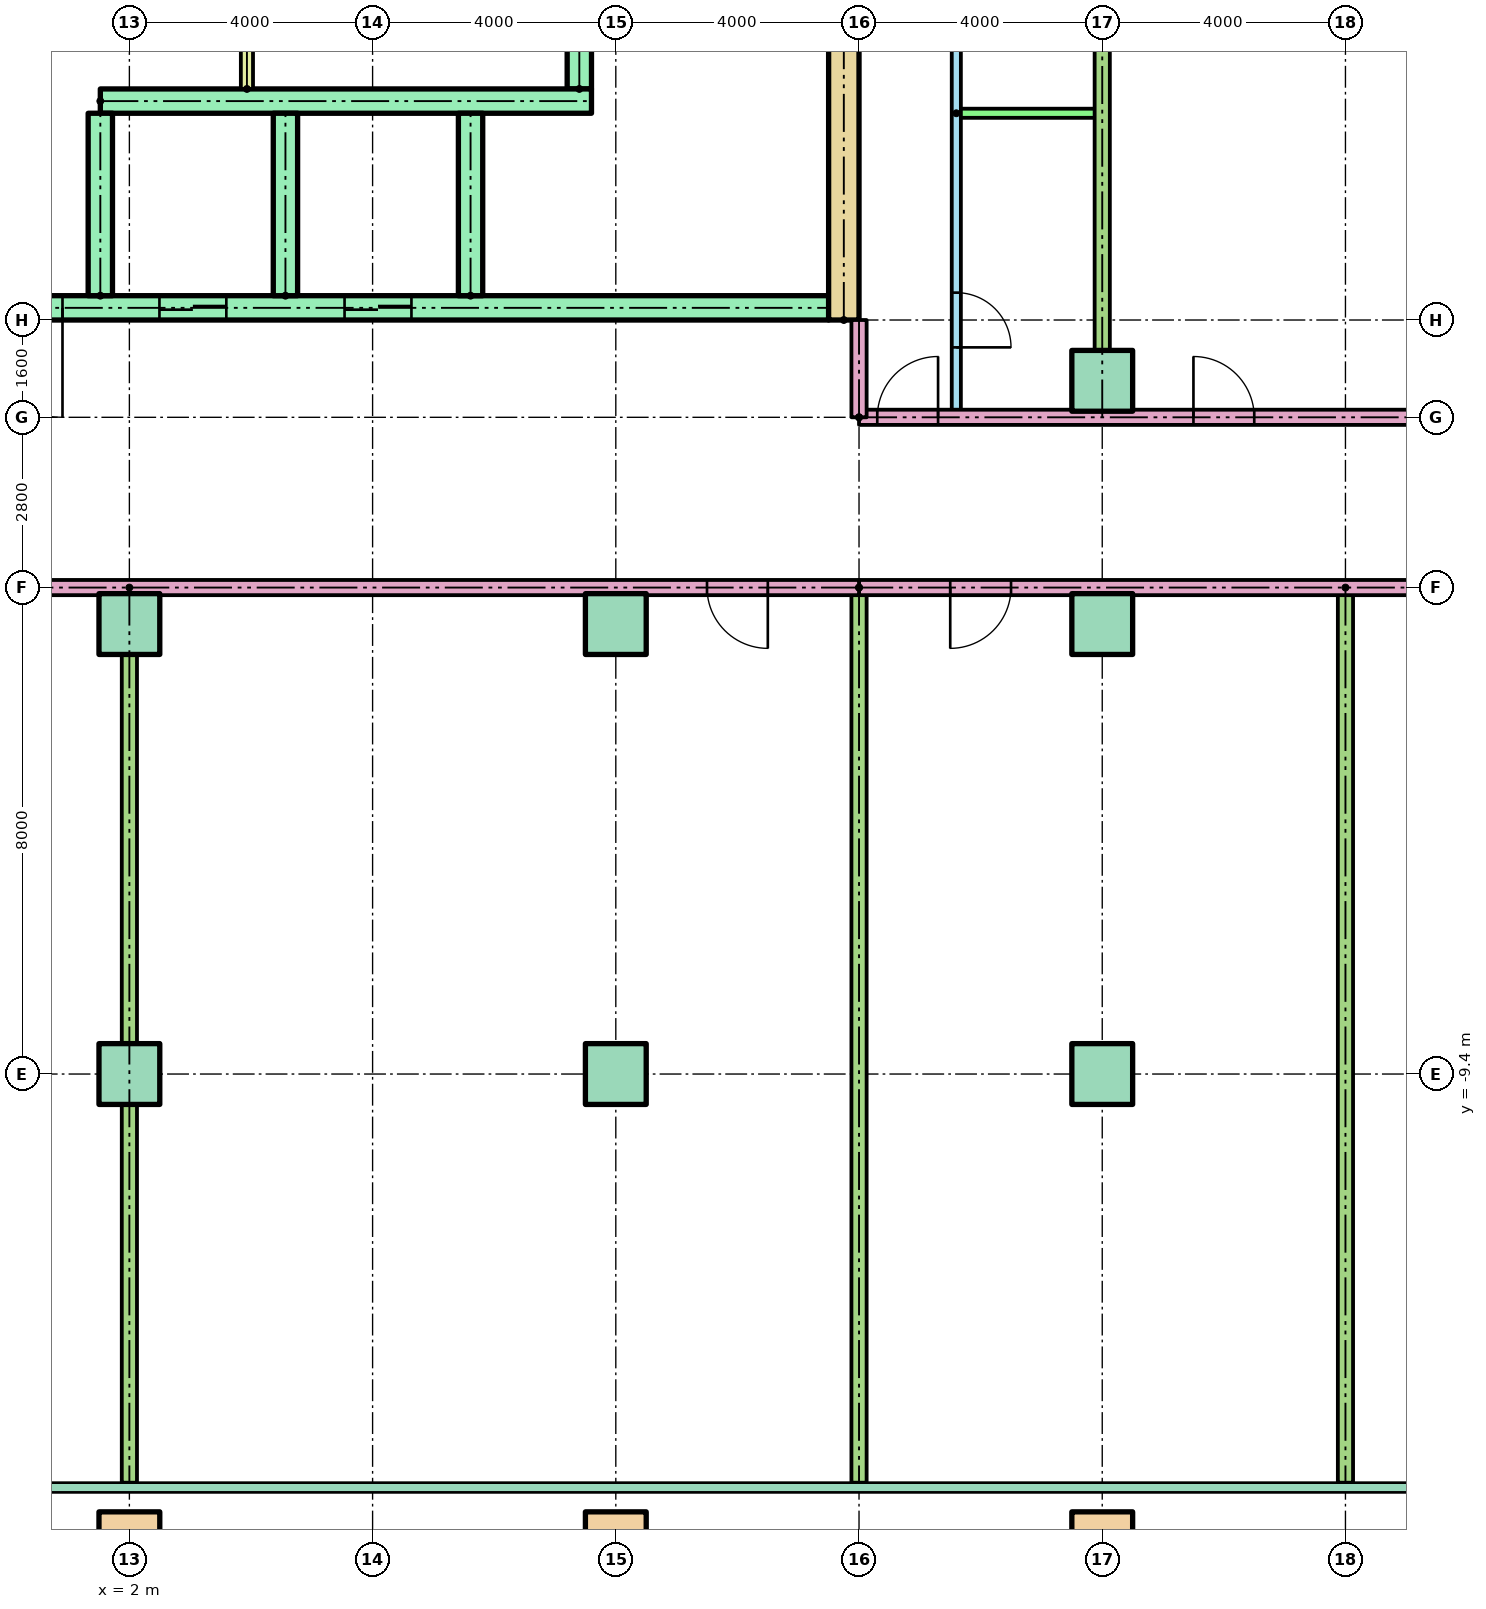
"""IFC4 building model, lengths in metres.
Left out: names, types, materials, properties, quantities, classifications, styles, units other than length and angle.
Written with IfcOpenShell. Run it as: python <this file> out.ifc"""

import sys

from ifc_helpers import new_model, si_unit, direction, frame, frame_2d, origin, origin_2d, place, context, subcontext, project, spatial, rectangle, hollow_rectangle, extrude, element, fill, save


model = new_model("IFC4")
c1 = context("Model", 3, precision=1e-05, world=origin(), true_north=direction((0.0, 1.0)))
c2 = subcontext(c1, "Body", "Model", "MODEL_VIEW")
j1 = project(units=[si_unit("LENGTHUNIT", "METRE"), si_unit("PLANEANGLEUNIT", "RADIAN")], contexts=[c1])
p1 = place(None, origin())
s1 = spatial("IfcSite", under=j1, at=p1, CompositionType="ELEMENT")
p2 = place(p1, origin())
s2 = spatial("IfcBuilding", under=s1, at=p2, CompositionType="ELEMENT")
p3 = place(p2, frame((0.0, 0.0, 29.9)))
s3 = spatial("IfcBuildingStorey", under=s2, at=p3, CompositionType="ELEMENT", Elevation=29.9)
for number, where in (
    (1, (2.0, -17.1, 0.0)),
    (2, (10.0, -17.1, 0.0)),
    (3, (18.0, -17.1, 0.0)),
):
    element("IfcColumn", number, at=place(p3, frame(where)), inside=s3, PredefinedType="COLUMN", context=c2, shape_type="SweptSolid", body=[
        extrude(hollow_rectangle(XDim=1.0, YDim=1.0, WallThickness=0.05, at=origin_2d()), origin(), (0.0, 0.0, 1.0), 3.9),
    ])
for number, where in (
    (4, (2.0, -9.4, 0.0)),
    (5, (10.0, -9.4, 0.0)),
    (6, (18.0, -9.4, 0.0)),
    (7, (2.0, -2.0, 0.0)),
    (8, (10.0, -2.0, 0.0)),
    (9, (18.0, -2.0, 0.0)),
    (10, (18.0, 2.0, 0.0)),
):
    element("IfcColumn", number, at=place(p3, frame(where)), inside=s3, PredefinedType="COLUMN", context=c2, shape_type="SweptSolid", body=[
        extrude(rectangle(XDim=1.0, YDim=1.0, at=origin_2d()), origin(), (0.0, 0.0, 1.0), 3.9),
    ])
p4 = place(p3, frame((13.75, 3.0, 0.0), z_axis=(0.0, 0.0, 1.0), x_axis=(0.0, 1.0, 0.0)))
e11 = element("IfcWall", 11, at=p4, inside=s3, PredefinedType="SHEAR", context=c2, shape_type="SweptSolid", body=[
    extrude(rectangle(XDim=17.0, YDim=0.5, at=frame_2d((8.5, 0.0))), origin(), (0.0, 0.0, 1.0), 3.6),
])
p5 = place(p3, frame((9.4, 6.8, 0.0), z_axis=(0.0, 0.0, 1.0), x_axis=(0.0, 1.0, 0.0)))
e12 = element("IfcWall", 12, at=p5, inside=s3, PredefinedType="SHEAR", context=c2, shape_type="SweptSolid", body=[
    extrude(rectangle(XDim=12.7, YDim=0.4, at=frame_2d((6.35, 0.0))), origin(), (0.0, 0.0, 1.0), 3.6),
])
p6 = place(p5, frame((1.15, 0.0, 0.0)))
e13 = element("IfcOpeningElement", 13, at=p6, cuts=e12, PredefinedType="OPENING", context=c2, shape_type="SweptSolid", body=[
    extrude(rectangle(XDim=1.0, YDim=2.1, at=frame_2d((0.5, 1.05))), frame((0.0, 0.21, 0.0), z_axis=(0.0, -1.0, 0.0), x_axis=(1.0, 0.0, 0.0)), (0.0, 0.0, 1.0), 0.42),
])
p7 = place(p5, frame((7.925, 0.0, 0.0)))
e14 = element("IfcOpeningElement", 14, at=p7, cuts=e12, PredefinedType="OPENING", context=c2, shape_type="SweptSolid", body=[
    extrude(rectangle(XDim=1.0, YDim=2.1, at=frame_2d((0.5, 1.05))), frame((0.0, 0.21, 0.0), z_axis=(0.0, -1.0, 0.0), x_axis=(1.0, 0.0, 0.0)), (0.0, 0.0, 1.0), 0.42),
])
p8 = place(p3, frame((-13.5, 3.2, 0.0)))
e15 = element("IfcWall", 15, at=p8, inside=s3, PredefinedType="SHEAR", context=c2, shape_type="SweptSolid", body=[
    extrude(rectangle(XDim=27.0, YDim=0.4, at=frame_2d((13.5, 0.0))), origin(), (0.0, 0.0, 1.0), 3.6),
])
p9 = place(p8, frame((6.861, 0.0, 0.0)))
e16 = element("IfcOpeningElement", 16, at=p9, cuts=e15, PredefinedType="OPENING", context=c2, shape_type="SweptSolid", body=[
    extrude(rectangle(XDim=1.1, YDim=2.1, at=frame_2d((0.55, 1.05))), frame((0.0, 0.21, 0.0), z_axis=(0.0, -1.0, 0.0), x_axis=(1.0, 0.0, 0.0)), (0.0, 0.0, 1.0), 0.42),
])
p10 = place(p8, frame((9.906, 0.0, 0.0)))
e17 = element("IfcOpeningElement", 17, at=p10, cuts=e15, PredefinedType="OPENING", context=c2, shape_type="SweptSolid", body=[
    extrude(rectangle(XDim=1.1, YDim=2.1, at=frame_2d((0.55, 1.05))), frame((0.0, 0.21, 0.0), z_axis=(0.0, -1.0, 0.0), x_axis=(1.0, 0.0, 0.0)), (0.0, 0.0, 1.0), 0.42),
])
p11 = place(p8, frame((15.994, 0.0, 0.0)))
e18 = element("IfcOpeningElement", 18, at=p11, cuts=e15, PredefinedType="OPENING", context=c2, shape_type="SweptSolid", body=[
    extrude(rectangle(XDim=1.1, YDim=2.1, at=frame_2d((0.55, 1.05))), frame((0.0, 0.21, 0.0), z_axis=(0.0, -1.0, 0.0), x_axis=(1.0, 0.0, 0.0)), (0.0, 0.0, 1.0), 0.42),
])
p12 = place(p8, frame((19.039, 0.0, 0.0)))
e19 = element("IfcOpeningElement", 19, at=p12, cuts=e15, PredefinedType="OPENING", context=c2, shape_type="SweptSolid", body=[
    extrude(rectangle(XDim=1.1, YDim=2.1, at=frame_2d((0.55, 1.05))), frame((0.0, 0.21, 0.0), z_axis=(0.0, -1.0, 0.0), x_axis=(1.0, 0.0, 0.0)), (0.0, 0.0, 1.0), 0.42),
])
p13 = place(p8, frame((12.6, 0.0, 0.0)))
e20 = element("IfcOpeningElement", 20, at=p13, cuts=e15, PredefinedType="OPENING", context=c2, shape_type="SweptSolid", body=[
    extrude(rectangle(XDim=1.8, YDim=2.1, at=frame_2d((0.9, 1.05))), frame((0.0, 0.21, 0.0), z_axis=(0.0, -1.0, 0.0), x_axis=(1.0, 0.0, 0.0)), (0.0, 0.0, 1.0), 0.42),
])
p14 = place(p3, frame((1.522, 6.6, 0.0)))
e21 = element("IfcWall", 21, at=p14, inside=s3, PredefinedType="SHEAR", context=c2, shape_type="SweptSolid", body=[
    extrude(rectangle(XDim=8.078, YDim=0.4, at=frame_2d((4.039, 0.0))), origin(), (0.0, 0.0, 1.0), 3.6),
])
for number, where, z_axis, x_axis in (
    (22, (1.522, 3.4, 0.0), (0.0, 0.0, 1.0), (0.0, 1.0, 0.0)),
    (23, (4.567, 3.4, 0.0), (0.0, 0.0, 1.0), (0.0, 1.0, 0.0)),
    (24, (7.611, 3.4, 0.0), (0.0, 0.0, 1.0), (0.0, 1.0, 0.0)),
):
    element("IfcWall", number, at=place(p3, frame(where, z_axis=z_axis, x_axis=x_axis)), inside=s3, PredefinedType="SHEAR", context=c2, shape_type="SweptSolid", body=[
        extrude(rectangle(XDim=3.0, YDim=0.4, at=frame_2d((1.5, 0.0))), origin(), (0.0, 0.0, 1.0), 3.6),
    ])
p15 = place(p3, frame((3.933, 6.8, 0.0), z_axis=(0.0, 0.0, 1.0), x_axis=(0.0, 1.0, 0.0)))
e25 = element("IfcWall", 25, at=p15, inside=s3, PredefinedType="PARTITIONING", context=c2, shape_type="SweptSolid", body=[
    extrude(rectangle(XDim=3.3, YDim=0.2, at=frame_2d((1.65, 0.0))), origin(), (0.0, 0.0, 1.0), 3.6),
])
p16 = place(p15, frame((1.1, 0.0, 0.0)))
e26 = element("IfcOpeningElement", 26, at=p16, cuts=e25, PredefinedType="OPENING", context=c2, shape_type="SweptSolid", body=[
    extrude(rectangle(XDim=1.1, YDim=2.1, at=frame_2d((0.55, 1.05))), frame((0.0, 0.11, 0.0), z_axis=(0.0, -1.0, 0.0), x_axis=(1.0, 0.0, 0.0)), (0.0, 0.0, 1.0), 0.22),
])
p17 = place(p3, frame((29.0, -1.4, 0.0), z_axis=(0.0, 0.0, 1.0), x_axis=(-1.0, 0.0, 0.0)))
e27 = element("IfcWall", 27, at=p17, inside=s3, PredefinedType="PARTITIONING", context=c2, shape_type="SweptSolid", body=[
    extrude(rectangle(XDim=15.0, YDim=0.25, at=frame_2d((7.5, 0.0))), origin(), (0.0, 0.0, 1.0), 3.1),
])
p18 = place(p17, frame((12.5, 0.0, 0.0)))
e28 = element("IfcOpeningElement", 28, at=p18, cuts=e27, PredefinedType="OPENING", context=c2, shape_type="SweptSolid", body=[
    extrude(rectangle(XDim=1.0, YDim=2.1, at=frame_2d((0.5, 1.05))), frame((0.0, 0.135, 0.0), z_axis=(0.0, -1.0, 0.0), x_axis=(1.0, 0.0, 0.0)), (0.0, 0.0, 1.0), 0.27),
])
p19 = place(p17, frame((4.5, 0.0, 0.0)))
e29 = element("IfcOpeningElement", 29, at=p19, cuts=e27, PredefinedType="OPENING", context=c2, shape_type="SweptSolid", body=[
    extrude(rectangle(XDim=1.0, YDim=2.1, at=frame_2d((0.5, 1.05))), frame((0.0, 0.135, 0.0), z_axis=(0.0, -1.0, 0.0), x_axis=(1.0, 0.0, 0.0)), (0.0, 0.0, 1.0), 0.27),
])
for number, where, z_axis, x_axis in (
    (30, (14.0, -1.4, 0.0), (0.0, 0.0, 1.0), (0.0, -1.0, 0.0)),
    (31, (22.0, -1.4, 0.0), (0.0, 0.0, 1.0), (0.0, -1.0, 0.0)),
):
    element("IfcWall", number, at=place(p3, frame(where, z_axis=z_axis, x_axis=x_axis)), inside=s3, PredefinedType="PARTITIONING", context=c2, shape_type="SweptSolid", body=[
        extrude(rectangle(XDim=14.721, YDim=0.25, at=frame_2d((7.361, 0.0))), origin(), (0.0, 0.0, 1.0), 3.1),
    ])
p20 = place(p3, frame((14.0, 1.4, 0.0)))
e32 = element("IfcWall", 32, at=p20, inside=s3, PredefinedType="PARTITIONING", context=c2, shape_type="SweptSolid", body=[
    extrude(rectangle(XDim=15.0, YDim=0.25, at=frame_2d((7.5, 0.0))), origin(), (0.0, 0.0, 1.0), 3.1),
])
p21 = place(p20, frame((0.3, 0.0, 0.0)))
e33 = element("IfcOpeningElement", 33, at=p21, cuts=e32, PredefinedType="OPENING", context=c2, shape_type="SweptSolid", body=[
    extrude(rectangle(XDim=1.0, YDim=2.1, at=frame_2d((0.5, 1.05))), frame((0.0, 0.135, 0.0), z_axis=(0.0, -1.0, 0.0), x_axis=(1.0, 0.0, 0.0)), (0.0, 0.0, 1.0), 0.27),
])
p22 = place(p20, frame((5.5, 0.0, 0.0)))
e34 = element("IfcOpeningElement", 34, at=p22, cuts=e32, PredefinedType="OPENING", context=c2, shape_type="SweptSolid", body=[
    extrude(rectangle(XDim=1.0, YDim=2.1, at=frame_2d((0.5, 1.05))), frame((0.0, 0.135, 0.0), z_axis=(0.0, -1.0, 0.0), x_axis=(1.0, 0.0, 0.0)), (0.0, 0.0, 1.0), 0.27),
])
p23 = place(p20, frame((13.5, 0.0, 0.0)))
e35 = element("IfcOpeningElement", 35, at=p23, cuts=e32, PredefinedType="OPENING", context=c2, shape_type="SweptSolid", body=[
    extrude(rectangle(XDim=1.0, YDim=2.1, at=frame_2d((0.5, 1.05))), frame((0.0, 0.135, 0.0), z_axis=(0.0, -1.0, 0.0), x_axis=(1.0, 0.0, 0.0)), (0.0, 0.0, 1.0), 0.27),
])
p24 = place(p3, frame((15.6, 18.521, 0.0), z_axis=(0.0, 0.0, 1.0), x_axis=(0.0, -1.0, 0.0)))
e36 = element("IfcWall", 36, at=p24, inside=s3, PredefinedType="PARTITIONING", context=c2, shape_type="SweptSolid", body=[
    extrude(rectangle(XDim=17.121, YDim=0.15, at=frame_2d((8.561, 0.0))), origin(), (0.0, 0.0, 1.0), 3.1),
])
p25 = place(p24, frame((15.071, 0.0, 0.0)))
e37 = element("IfcOpeningElement", 37, at=p25, cuts=e36, PredefinedType="OPENING", context=c2, shape_type="SweptSolid", body=[
    extrude(rectangle(XDim=0.9, YDim=2.1, at=frame_2d((0.45, 1.05))), frame((0.0, 0.085, 0.0), z_axis=(0.0, -1.0, 0.0), x_axis=(1.0, 0.0, 0.0)), (0.0, 0.0, 1.0), 0.17),
])
p26 = place(p24, frame((10.071, 0.0, 0.0)))
e38 = element("IfcOpeningElement", 38, at=p26, cuts=e36, PredefinedType="OPENING", context=c2, shape_type="SweptSolid", body=[
    extrude(rectangle(XDim=0.9, YDim=2.1, at=frame_2d((0.45, 1.05))), frame((0.0, 0.085, 0.0), z_axis=(0.0, -1.0, 0.0), x_axis=(1.0, 0.0, 0.0)), (0.0, 0.0, 1.0), 0.17),
])
p27 = place(p24, frame((5.021, 0.0, 0.0)))
e39 = element("IfcOpeningElement", 39, at=p27, cuts=e36, PredefinedType="OPENING", context=c2, shape_type="SweptSolid", body=[
    extrude(rectangle(XDim=1.0, YDim=2.1, at=frame_2d((0.5, 1.05))), frame((0.0, 0.085, 0.0), z_axis=(0.0, -1.0, 0.0), x_axis=(1.0, 0.0, 0.0)), (0.0, 0.0, 1.0), 0.17),
])
p28 = place(p24, frame((1.471, 0.0, 0.0)))
e40 = element("IfcOpeningElement", 40, at=p28, cuts=e36, PredefinedType="OPENING", context=c2, shape_type="SweptSolid", body=[
    extrude(rectangle(XDim=0.9, YDim=2.1, at=frame_2d((0.45, 1.05))), frame((0.0, 0.085, 0.0), z_axis=(0.0, -1.0, 0.0), x_axis=(1.0, 0.0, 0.0)), (0.0, 0.0, 1.0), 0.17),
])
p29 = place(p3, frame((15.6, 6.4, 0.0)))
e41 = element("IfcWall", 41, at=p29, inside=s3, PredefinedType="PARTITIONING", context=c2, shape_type="SweptSolid", body=[
    extrude(rectangle(XDim=2.4, YDim=0.15, at=frame_2d((1.2, 0.0))), origin(), (0.0, 0.0, 1.0), 3.1),
])
p30 = place(p3, frame((18.0, 18.521, 0.0), z_axis=(0.0, 0.0, 1.0), x_axis=(0.0, -1.0, 0.0)))
e42 = element("IfcWall", 42, at=p30, inside=s3, PredefinedType="PARTITIONING", context=c2, shape_type="SweptSolid", body=[
    extrude(rectangle(XDim=17.121, YDim=0.25, at=frame_2d((8.561, 0.0))), origin(), (0.0, 0.0, 1.0), 3.1),
])
p31 = place(p3, frame((2.0, -1.4, 0.0), z_axis=(0.0, 0.0, 1.0), x_axis=(0.0, -1.0, 0.0)))
e43 = element("IfcWall", 43, at=p31, inside=s3, PredefinedType="PARTITIONING", context=c2, shape_type="SweptSolid", body=[
    extrude(rectangle(XDim=14.721, YDim=0.25, at=frame_2d((7.361, 0.0))), origin(), (0.0, 0.0, 1.0), 3.1),
])
p32 = place(p3, frame((14.0, -1.4, 0.0), z_axis=(0.0, 0.0, 1.0), x_axis=(-1.0, 0.0, 0.0)))
e44 = element("IfcWall", 44, at=p32, inside=s3, PredefinedType="PARTITIONING", context=c2, shape_type="SweptSolid", body=[
    extrude(rectangle(XDim=28.0, YDim=0.25, at=frame_2d((14.0, 0.0))), origin(), (0.0, 0.0, 1.0), 3.1),
])
p33 = place(p32, frame((25.5, 0.0, 0.0)))
e45 = element("IfcOpeningElement", 45, at=p33, cuts=e44, PredefinedType="OPENING", context=c2, shape_type="SweptSolid", body=[
    extrude(rectangle(XDim=1.0, YDim=2.1, at=frame_2d((0.5, 1.05))), frame((0.0, 0.135, 0.0), z_axis=(0.0, -1.0, 0.0), x_axis=(1.0, 0.0, 0.0)), (0.0, 0.0, 1.0), 0.27),
])
p34 = place(p32, frame((1.5, 0.0, 0.0)))
e46 = element("IfcOpeningElement", 46, at=p34, cuts=e44, PredefinedType="OPENING", context=c2, shape_type="SweptSolid", body=[
    extrude(rectangle(XDim=1.0, YDim=2.1, at=frame_2d((0.5, 1.05))), frame((0.0, 0.135, 0.0), z_axis=(0.0, -1.0, 0.0), x_axis=(1.0, 0.0, 0.0)), (0.0, 0.0, 1.0), 0.27),
])
p35 = place(p3, frame((14.0, 1.4, 0.0), z_axis=(0.0, 0.0, 1.0), x_axis=(0.0, 1.0, 0.0)))
e47 = element("IfcWall", 47, at=p35, inside=s3, PredefinedType="PARTITIONING", context=c2, shape_type="SweptSolid", body=[
    extrude(rectangle(XDim=1.6, YDim=0.25, at=frame_2d((0.8, 0.0))), origin(), (0.0, 0.0, 1.0), 3.1),
])
p36 = place(p11, origin())
e48 = element("IfcDoor", 48, at=p36, inside=s3, OperationType="SLIDING_TO_LEFT", PredefinedType="DOOR", context=c2, shape_type="SweptSolid", body=[
    extrude(rectangle(XDim=1.1, YDim=2.1, at=frame_2d((0.55, 1.05))), frame((0.0, 0.025, 0.0), z_axis=(0.0, -1.0, 0.0), x_axis=(1.0, 0.0, 0.0)), (0.0, 0.0, 1.0), 0.05),
])
fill(e18, e48)
p37 = place(p12, origin())
e49 = element("IfcDoor", 49, at=p37, inside=s3, OperationType="SLIDING_TO_LEFT", PredefinedType="DOOR", context=c2, shape_type="SweptSolid", body=[
    extrude(rectangle(XDim=1.1, YDim=2.1, at=frame_2d((0.55, 1.05))), frame((0.0, 0.025, 0.0), z_axis=(0.0, -1.0, 0.0), x_axis=(1.0, 0.0, 0.0)), (0.0, 0.0, 1.0), 0.05),
])
fill(e19, e49)
p38 = place(p13, frame((1.8, 0.0, 0.0), z_axis=(0.0, 0.0, 1.0), x_axis=(-1.0, 0.0, 0.0)))
e50 = element("IfcDoor", 50, at=p38, inside=s3, OperationType="DOUBLE_DOOR_SINGLE_SWING", PredefinedType="DOOR", context=c2, shape_type="SweptSolid", body=[
    extrude(rectangle(XDim=1.8, YDim=2.1, at=frame_2d((0.9, 1.05))), frame((0.0, 0.025, 0.0), z_axis=(0.0, -1.0, 0.0), x_axis=(1.0, 0.0, 0.0)), (0.0, 0.0, 1.0), 0.05),
])
fill(e20, e50)
p39 = place(p18, origin())
e51 = element("IfcDoor", 51, at=p39, inside=s3, OperationType="SINGLE_SWING_RIGHT", PredefinedType="DOOR", context=c2, shape_type="SweptSolid", body=[
    extrude(rectangle(XDim=1.0, YDim=2.1, at=frame_2d((0.5, 1.05))), frame((0.0, 0.025, 0.0), z_axis=(0.0, -1.0, 0.0), x_axis=(1.0, 0.0, 0.0)), (0.0, 0.0, 1.0), 0.05),
])
fill(e28, e51)
p40 = place(p25, origin())
e52 = element("IfcDoor", 52, at=p40, inside=s3, OperationType="SINGLE_SWING_RIGHT", PredefinedType="DOOR", context=c2, shape_type="SweptSolid", body=[
    extrude(rectangle(XDim=0.9, YDim=2.1, at=frame_2d((0.45, 1.05))), frame((0.0, 0.025, 0.0), z_axis=(0.0, -1.0, 0.0), x_axis=(1.0, 0.0, 0.0)), (0.0, 0.0, 1.0), 0.05),
])
fill(e37, e52)
p41 = place(p21, origin())
e53 = element("IfcDoor", 53, at=p41, inside=s3, OperationType="SINGLE_SWING_RIGHT", PredefinedType="DOOR", context=c2, shape_type="SweptSolid", body=[
    extrude(rectangle(XDim=1.0, YDim=2.1, at=frame_2d((0.5, 1.05))), frame((0.0, 0.025, 0.0), z_axis=(0.0, -1.0, 0.0), x_axis=(1.0, 0.0, 0.0)), (0.0, 0.0, 1.0), 0.05),
])
fill(e33, e53)
p42 = place(p22, origin())
e54 = element("IfcDoor", 54, at=p42, inside=s3, OperationType="SINGLE_SWING_LEFT", PredefinedType="DOOR", context=c2, shape_type="SweptSolid", body=[
    extrude(rectangle(XDim=1.0, YDim=2.1, at=frame_2d((0.5, 1.05))), frame((0.0, 0.025, 0.0), z_axis=(0.0, -1.0, 0.0), x_axis=(1.0, 0.0, 0.0)), (0.0, 0.0, 1.0), 0.05),
])
fill(e34, e54)
p43 = place(p34, origin())
e55 = element("IfcDoor", 55, at=p43, inside=s3, OperationType="SINGLE_SWING_LEFT", PredefinedType="DOOR", context=c2, shape_type="SweptSolid", body=[
    extrude(rectangle(XDim=1.0, YDim=2.1, at=frame_2d((0.5, 1.05))), frame((0.0, 0.025, 0.0), z_axis=(0.0, -1.0, 0.0), x_axis=(1.0, 0.0, 0.0)), (0.0, 0.0, 1.0), 0.05),
])
fill(e46, e55)
save(model, sys.argv[1])
